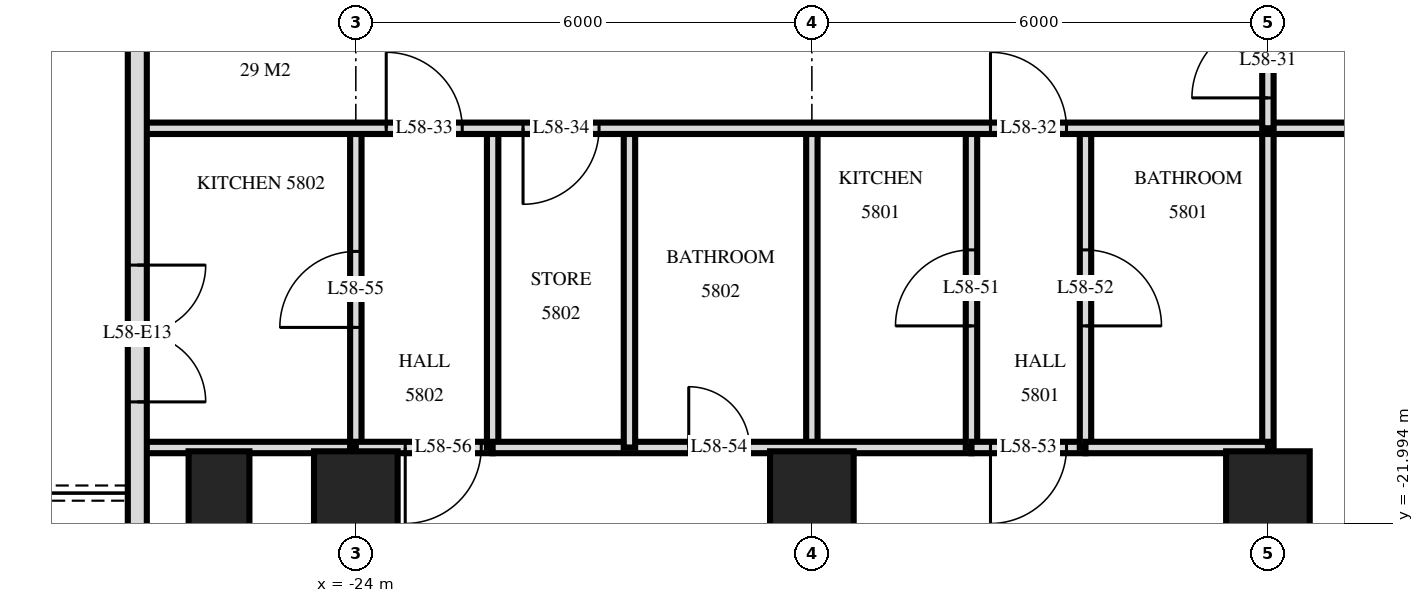
"""IFC4 building model, lengths in metres.
Left out: names, types, materials, properties, quantities, classifications, styles, units other than length and angle.
Written with IfcOpenShell. Run it as: python <this file> out.ifc"""

import sys

from ifc_helpers import new_model, si_unit, direction, frame, frame_2d, origin, origin_2d, place, context, subcontext, project, spatial, rectangle, extrude, element, fill, save


model = new_model("IFC4")
c1 = context("Model", 3, precision=1e-05, world=origin(), true_north=direction((0.0, 1.0)))
c2 = subcontext(c1, "Body", "Model", "MODEL_VIEW")
j1 = project(units=[si_unit("LENGTHUNIT", "METRE"), si_unit("PLANEANGLEUNIT", "RADIAN")], contexts=[c1])
p1 = place(None, origin())
s1 = spatial("IfcSite", under=j1, at=p1, CompositionType="ELEMENT")
p2 = place(p1, origin())
s2 = spatial("IfcBuilding", under=s1, at=p2, CompositionType="ELEMENT")
p3 = place(p2, frame((0.0, 0.0, 222.1)))
s3 = spatial("IfcBuildingStorey", under=s2, at=p3, CompositionType="ELEMENT", Elevation=222.1)
p4 = place(p3, frame((-25.8, -21.6, 0.0), z_axis=(0.0, 0.0, 1.0), x_axis=(0.0, 1.0, 0.0)))
e1 = element("IfcColumn", 1, at=p4, inside=s3, PredefinedType="COLUMN", context=c2, shape_type="SweptSolid", body=[
    extrude(rectangle(XDim=1.1, YDim=0.8, at=origin_2d()), origin(), (0.0, 0.0, 1.0), 3.5),
])
for number, where, z_axis, x_axis in (
    (2, (-24.0, -21.6, 0.0), (0.0, 0.0, 1.0), (1.0, 0.0, 0.0)),
    (3, (-18.0, -21.6, 0.0), (0.0, 0.0, 1.0), (1.0, 0.0, 0.0)),
    (4, (-12.0, -21.6, 0.0), (0.0, 0.0, 1.0), (1.0, 0.0, 0.0)),
):
    element("IfcColumn", number, at=place(p3, frame(where, z_axis=z_axis, x_axis=x_axis)), inside=s3, PredefinedType="COLUMN", context=c2, shape_type="SweptSolid", body=[
        extrude(rectangle(XDim=1.1, YDim=1.1, at=origin_2d()), origin(), (0.0, 0.0, 1.0), 3.5),
    ])
p5 = place(p3, frame((-26.875, -3.325, 0.0), z_axis=(0.0, 0.0, 1.0), x_axis=(0.0, -1.0, 0.0)))
e5 = element("IfcWall", 5, at=p5, inside=s3, PredefinedType="SOLIDWALL", context=c2, shape_type="SweptSolid", body=[
    extrude(rectangle(XDim=21.551, YDim=0.25, at=frame_2d((10.775, 0.0))), origin(), (0.0, 0.0, 1.0), 3.22),
])
p6 = place(p5, frame((7.275, 0.0, 0.0)))
e6 = element("IfcOpeningElement", 6, at=p6, cuts=e5, PredefinedType="OPENING", context=c2, shape_type="SweptSolid", body=[
    extrude(rectangle(XDim=1.8, YDim=2.4, at=frame_2d((0.9, 1.2))), frame((0.0, 0.135, 0.0), z_axis=(0.0, -1.0, 0.0), x_axis=(1.0, 0.0, 0.0)), (0.0, 0.0, 1.0), 0.27),
])
p7 = place(p5, frame((15.275, 0.0, 0.0)))
e7 = element("IfcOpeningElement", 7, at=p7, cuts=e5, PredefinedType="OPENING", context=c2, shape_type="SweptSolid", body=[
    extrude(rectangle(XDim=1.8, YDim=2.4, at=frame_2d((0.9, 1.2))), frame((0.0, 0.135, 0.0), z_axis=(0.0, -1.0, 0.0), x_axis=(1.0, 0.0, 0.0)), (0.0, 0.0, 1.0), 0.27),
])
p8 = place(p5, frame((18.875, 0.0, 0.0)))
e8 = element("IfcOpeningElement", 8, at=p8, cuts=e5, PredefinedType="OPENING", context=c2, shape_type="SweptSolid", body=[
    extrude(rectangle(XDim=1.8, YDim=2.4, at=frame_2d((0.9, 1.2))), frame((0.0, 0.135, 0.0), z_axis=(0.0, -1.0, 0.0), x_axis=(1.0, 0.0, 0.0)), (0.0, 0.0, 1.0), 0.27),
])
p9 = place(p3, frame((-12.0, -16.8, 0.0), z_axis=(0.0, 0.0, 1.0), x_axis=(0.0, 1.0, 0.0)))
e9 = element("IfcWall", 9, at=p9, inside=s3, PredefinedType="PARTITIONING", context=c2, shape_type="SweptSolid", body=[
    extrude(rectangle(XDim=1.75, YDim=0.15, at=frame_2d((0.875, 0.0))), origin(), (0.0, 0.0, 1.0), 3.22),
])
p10 = place(p9, frame((0.4, 0.0, 0.0)))
e10 = element("IfcOpeningElement", 10, at=p10, cuts=e9, PredefinedType="OPENING", context=c2, shape_type="SweptSolid", body=[
    extrude(rectangle(XDim=1.0, YDim=2.1, at=frame_2d((0.5, 1.05))), frame((0.0, 0.085, 0.0), z_axis=(0.0, -1.0, 0.0), x_axis=(1.0, 0.0, 0.0)), (0.0, 0.0, 1.0), 0.17),
])
p11 = place(p3, frame((-12.0, -29.22, 0.0), z_axis=(0.0, 0.0, 1.0), x_axis=(0.0, 1.0, 0.0)))
e11 = element("IfcWall", 11, at=p11, inside=s3, PredefinedType="PARTITIONING", context=c2, shape_type="SweptSolid", body=[
    extrude(rectangle(XDim=12.42, YDim=0.15, at=frame_2d((6.21, 0.0))), origin(), (0.0, 0.0, 1.0), 3.22),
])
p12 = place(p3, frame((-14.4, -21.0, 0.0), z_axis=(0.0, 0.0, 1.0), x_axis=(0.0, 1.0, 0.0)))
e12 = element("IfcWall", 12, at=p12, inside=s3, PredefinedType="PARTITIONING", context=c2, shape_type="SweptSolid", body=[
    extrude(rectangle(XDim=4.2, YDim=0.15, at=frame_2d((2.1, 0.0))), origin(), (0.0, 0.0, 1.0), 3.22),
])
p13 = place(p12, frame((1.6, 0.0, 0.0)))
e13 = element("IfcOpeningElement", 13, at=p13, cuts=e12, PredefinedType="OPENING", context=c2, shape_type="SweptSolid", body=[
    extrude(rectangle(XDim=1.0, YDim=2.1, at=frame_2d((0.5, 1.05))), frame((0.0, 0.085, 0.0), z_axis=(0.0, -1.0, 0.0), x_axis=(1.0, 0.0, 0.0)), (0.0, 0.0, 1.0), 0.17),
])
p14 = place(p3, frame((-15.9, -21.0, 0.0), z_axis=(0.0, 0.0, 1.0), x_axis=(0.0, 1.0, 0.0)))
e14 = element("IfcWall", 14, at=p14, inside=s3, PredefinedType="PARTITIONING", context=c2, shape_type="SweptSolid", body=[
    extrude(rectangle(XDim=4.2, YDim=0.15, at=frame_2d((2.1, 0.0))), origin(), (0.0, 0.0, 1.0), 3.22),
])
p15 = place(p14, frame((1.6, 0.0, 0.0)))
e15 = element("IfcOpeningElement", 15, at=p15, cuts=e14, PredefinedType="OPENING", context=c2, shape_type="SweptSolid", body=[
    extrude(rectangle(XDim=1.0, YDim=2.1, at=frame_2d((0.5, 1.05))), frame((0.0, 0.085, 0.0), z_axis=(0.0, -1.0, 0.0), x_axis=(1.0, 0.0, 0.0)), (0.0, 0.0, 1.0), 0.17),
])
p16 = place(p3, frame((-18.0, -29.22, 0.0), z_axis=(0.0, 0.0, 1.0), x_axis=(0.0, 1.0, 0.0)))
e16 = element("IfcWall", 16, at=p16, inside=s3, PredefinedType="PARTITIONING", context=c2, shape_type="SweptSolid", body=[
    extrude(rectangle(XDim=12.42, YDim=0.15, at=frame_2d((6.21, 0.0))), origin(), (0.0, 0.0, 1.0), 3.22),
])
for number, where, z_axis, x_axis in (
    (17, (-20.4, -21.0, 0.0), (0.0, 0.0, 1.0), (0.0, 1.0, 0.0)),
    (18, (-22.2, -21.0, 0.0), (0.0, 0.0, 1.0), (0.0, 1.0, 0.0)),
):
    element("IfcWall", number, at=place(p3, frame(where, z_axis=z_axis, x_axis=x_axis)), inside=s3, PredefinedType="PARTITIONING", context=c2, shape_type="SweptSolid", body=[
        extrude(rectangle(XDim=4.2, YDim=0.15, at=frame_2d((2.1, 0.0))), origin(), (0.0, 0.0, 1.0), 3.22),
    ])
p17 = place(p3, frame((-24.0, -21.0, 0.0), z_axis=(0.0, 0.0, 1.0), x_axis=(0.0, 1.0, 0.0)))
e19 = element("IfcWall", 19, at=p17, inside=s3, PredefinedType="PARTITIONING", context=c2, shape_type="SweptSolid", body=[
    extrude(rectangle(XDim=4.2, YDim=0.15, at=frame_2d((2.1, 0.0))), origin(), (0.0, 0.0, 1.0), 3.22),
])
p18 = place(p17, frame((1.58, 0.0, 0.0)))
e20 = element("IfcOpeningElement", 20, at=p18, cuts=e19, PredefinedType="OPENING", context=c2, shape_type="SweptSolid", body=[
    extrude(rectangle(XDim=1.0, YDim=2.1, at=frame_2d((0.5, 1.05))), frame((0.0, 0.085, 0.0), z_axis=(0.0, -1.0, 0.0), x_axis=(1.0, 0.0, 0.0)), (0.0, 0.0, 1.0), 0.17),
])
p19 = place(p3, frame((-24.0, -28.918, 0.0), z_axis=(0.0, 0.0, 1.0), x_axis=(0.0, 1.0, 0.0)))
e21 = element("IfcWall", 21, at=p19, inside=s3, PredefinedType="PARTITIONING", context=c2, shape_type="SweptSolid", body=[
    extrude(rectangle(XDim=7.918, YDim=0.15, at=frame_2d((3.959, 0.0))), origin(), (0.0, 0.0, 1.0), 3.22),
])
p20 = place(p19, frame((3.436, 0.0, 0.0)))
e22 = element("IfcOpeningElement", 22, at=p20, cuts=e21, PredefinedType="OPENING", context=c2, shape_type="SweptSolid", body=[
    extrude(rectangle(XDim=0.9, YDim=2.1, at=frame_2d((0.45, 1.05))), frame((0.0, 0.085, 0.0), z_axis=(0.0, -1.0, 0.0), x_axis=(1.0, 0.0, 0.0)), (0.0, 0.0, 1.0), 0.17),
])
p21 = place(p3, frame((-24.0, -21.0, 0.0), z_axis=(0.0, 0.0, 1.0), x_axis=(1.0, 0.0, 0.0)))
e23 = element("IfcWall", 23, at=p21, inside=s3, PredefinedType="PARTITIONING", context=c2, shape_type="SweptSolid", body=[
    extrude(rectangle(XDim=1.8, YDim=0.15, at=frame_2d((0.9, 0.0))), origin(), (0.0, 0.0, 1.0), 3.22),
])
p22 = place(p21, frame((0.65, 0.0, 0.0)))
e24 = element("IfcOpeningElement", 24, at=p22, cuts=e23, PredefinedType="OPENING", context=c2, shape_type="SweptSolid", body=[
    extrude(rectangle(XDim=1.0, YDim=2.1, at=frame_2d((0.5, 1.05))), frame((0.0, 0.085, 0.0), z_axis=(0.0, -1.0, 0.0), x_axis=(1.0, 0.0, 0.0)), (0.0, 0.0, 1.0), 0.17),
])
p23 = place(p3, frame((-15.9, -21.0, 0.0), z_axis=(0.0, 0.0, 1.0), x_axis=(1.0, 0.0, 0.0)))
e25 = element("IfcWall", 25, at=p23, inside=s3, PredefinedType="PARTITIONING", context=c2, shape_type="SweptSolid", body=[
    extrude(rectangle(XDim=1.5, YDim=0.15, at=frame_2d((0.75, 0.0))), origin(), (0.0, 0.0, 1.0), 3.22),
])
p24 = place(p23, frame((0.25, 0.0, 0.0)))
e26 = element("IfcOpeningElement", 26, at=p24, cuts=e25, PredefinedType="OPENING", context=c2, shape_type="SweptSolid", body=[
    extrude(rectangle(XDim=1.0, YDim=2.1, at=frame_2d((0.5, 1.05))), frame((0.0, 0.085, 0.0), z_axis=(0.0, -1.0, 0.0), x_axis=(1.0, 0.0, 0.0)), (0.0, 0.0, 1.0), 0.17),
])
p25 = place(p3, frame((-26.82, -21.0, 0.0), z_axis=(0.0, 0.0, 1.0), x_axis=(1.0, 0.0, 0.0)))
e27 = element("IfcWall", 27, at=p25, inside=s3, PredefinedType="PARTITIONING", context=c2, shape_type="SweptSolid", body=[
    extrude(rectangle(XDim=2.82, YDim=0.15, at=frame_2d((1.41, 0.0))), origin(), (0.0, 0.0, 1.0), 3.22),
])
p26 = place(p3, frame((-22.2, -21.0, 0.0), z_axis=(0.0, 0.0, 1.0), x_axis=(1.0, 0.0, 0.0)))
e28 = element("IfcWall", 28, at=p26, inside=s3, PredefinedType="PARTITIONING", context=c2, shape_type="SweptSolid", body=[
    extrude(rectangle(XDim=6.3, YDim=0.15, at=frame_2d((3.15, 0.0))), origin(), (0.0, 0.0, 1.0), 3.22),
])
p27 = place(p26, frame((2.58, 0.0, 0.0)))
e29 = element("IfcOpeningElement", 29, at=p27, cuts=e28, PredefinedType="OPENING", context=c2, shape_type="SweptSolid", body=[
    extrude(rectangle(XDim=0.8, YDim=2.1, at=frame_2d((0.4, 1.05))), frame((0.0, 0.085, 0.0), z_axis=(0.0, -1.0, 0.0), x_axis=(1.0, 0.0, 0.0)), (0.0, 0.0, 1.0), 0.17),
])
p28 = place(p3, frame((-14.4, -21.0, 0.0), z_axis=(0.0, 0.0, 1.0), x_axis=(1.0, 0.0, 0.0)))
e30 = element("IfcWall", 30, at=p28, inside=s3, PredefinedType="PARTITIONING", context=c2, shape_type="SweptSolid", body=[
    extrude(rectangle(XDim=2.4, YDim=0.15, at=frame_2d((1.2, 0.0))), origin(), (0.0, 0.0, 1.0), 3.22),
])
p29 = place(p3, frame((-26.82, -16.8, 0.0), z_axis=(0.0, 0.0, 1.0), x_axis=(1.0, 0.0, 0.0)))
e31 = element("IfcWall", 31, at=p29, inside=s3, PredefinedType="PARTITIONING", context=c2, shape_type="SweptSolid", body=[
    extrude(rectangle(XDim=53.64, YDim=0.15, at=frame_2d((26.82, 0.0))), origin(), (0.0, 0.0, 1.0), 3.22),
])
p30 = place(p29, frame((11.17, 0.0, 0.0)))
e32 = element("IfcOpeningElement", 32, at=p30, cuts=e31, PredefinedType="OPENING", context=c2, shape_type="SweptSolid", body=[
    extrude(rectangle(XDim=1.0, YDim=2.1, at=frame_2d((0.5, 1.05))), frame((0.0, 0.085, 0.0), z_axis=(0.0, -1.0, 0.0), x_axis=(1.0, 0.0, 0.0)), (0.0, 0.0, 1.0), 0.17),
])
p31 = place(p29, frame((3.22, 0.0, 0.0)))
e33 = element("IfcOpeningElement", 33, at=p31, cuts=e31, PredefinedType="OPENING", context=c2, shape_type="SweptSolid", body=[
    extrude(rectangle(XDim=1.0, YDim=2.1, at=frame_2d((0.5, 1.05))), frame((0.0, 0.085, 0.0), z_axis=(0.0, -1.0, 0.0), x_axis=(1.0, 0.0, 0.0)), (0.0, 0.0, 1.0), 0.17),
])
p32 = place(p29, frame((5.02, 0.0, 0.0)))
e34 = element("IfcOpeningElement", 34, at=p32, cuts=e31, PredefinedType="OPENING", context=c2, shape_type="SweptSolid", body=[
    extrude(rectangle(XDim=1.0, YDim=2.1, at=frame_2d((0.5, 1.05))), frame((0.0, 0.085, 0.0), z_axis=(0.0, -1.0, 0.0), x_axis=(1.0, 0.0, 0.0)), (0.0, 0.0, 1.0), 0.17),
])
p33 = place(p29, frame((47.72, 0.0, 0.0)))
e35 = element("IfcOpeningElement", 35, at=p33, cuts=e31, PredefinedType="OPENING", context=c2, shape_type="SweptSolid", body=[
    extrude(rectangle(XDim=1.0, YDim=2.1, at=frame_2d((0.5, 1.05))), frame((0.0, 0.085, 0.0), z_axis=(0.0, -1.0, 0.0), x_axis=(1.0, 0.0, 0.0)), (0.0, 0.0, 1.0), 0.17),
])
p34 = place(p29, frame((51.04, 0.0, 0.0)))
e36 = element("IfcOpeningElement", 36, at=p34, cuts=e31, PredefinedType="OPENING", context=c2, shape_type="SweptSolid", body=[
    extrude(rectangle(XDim=1.0, YDim=2.1, at=frame_2d((0.5, 1.05))), frame((0.0, 0.085, 0.0), z_axis=(0.0, -1.0, 0.0), x_axis=(1.0, 0.0, 0.0)), (0.0, 0.0, 1.0), 0.17),
])
p35 = place(p29, frame((17.32, 0.0, 0.0)))
e37 = element("IfcOpeningElement", 37, at=p35, cuts=e31, PredefinedType="OPENING", context=c2, shape_type="SweptSolid", body=[
    extrude(rectangle(XDim=1.0, YDim=2.1, at=frame_2d((0.5, 1.05))), frame((0.0, 0.085, 0.0), z_axis=(0.0, -1.0, 0.0), x_axis=(1.0, 0.0, 0.0)), (0.0, 0.0, 1.0), 0.17),
])
p36 = place(p29, frame((26.32, 0.0, 0.0)))
e38 = element("IfcOpeningElement", 38, at=p36, cuts=e31, PredefinedType="OPENING", context=c2, shape_type="SweptSolid", body=[
    extrude(rectangle(XDim=1.0, YDim=2.1, at=frame_2d((0.5, 1.05))), frame((0.0, 0.085, 0.0), z_axis=(0.0, -1.0, 0.0), x_axis=(1.0, 0.0, 0.0)), (0.0, 0.0, 1.0), 0.17),
])
p37 = place(p29, frame((35.32, 0.0, 0.0)))
e39 = element("IfcOpeningElement", 39, at=p37, cuts=e31, PredefinedType="OPENING", context=c2, shape_type="SweptSolid", body=[
    extrude(rectangle(XDim=1.0, YDim=2.1, at=frame_2d((0.5, 1.05))), frame((0.0, 0.085, 0.0), z_axis=(0.0, -1.0, 0.0), x_axis=(1.0, 0.0, 0.0)), (0.0, 0.0, 1.0), 0.17),
])
p38 = place(p7, origin())
e40 = element("IfcDoor", 40, at=p38, inside=s3, OperationType="DOUBLE_DOOR_SINGLE_SWING", PredefinedType="DOOR", context=c2, shape_type="SweptSolid", body=[
    extrude(rectangle(XDim=1.8, YDim=2.4, at=frame_2d((0.9, 1.2))), frame((0.0, 0.025, 0.0), z_axis=(0.0, -1.0, 0.0), x_axis=(1.0, 0.0, 0.0)), (0.0, 0.0, 1.0), 0.05),
])
fill(e7, e40)
p39 = place(p10, origin())
e41 = element("IfcDoor", 41, at=p39, inside=s3, OperationType="SINGLE_SWING_RIGHT", PredefinedType="DOOR", context=c2, shape_type="SweptSolid", body=[
    extrude(rectangle(XDim=1.0, YDim=2.1, at=frame_2d((0.5, 1.05))), frame((0.0, 0.025, 0.0), z_axis=(0.0, -1.0, 0.0), x_axis=(1.0, 0.0, 0.0)), (0.0, 0.0, 1.0), 0.05),
])
fill(e10, e41)
p40 = place(p30, origin())
e42 = element("IfcDoor", 42, at=p40, inside=s3, OperationType="SINGLE_SWING_RIGHT", PredefinedType="DOOR", context=c2, shape_type="SweptSolid", body=[
    extrude(rectangle(XDim=1.0, YDim=2.1, at=frame_2d((0.5, 1.05))), frame((0.0, 0.025, 0.0), z_axis=(0.0, -1.0, 0.0), x_axis=(1.0, 0.0, 0.0)), (0.0, 0.0, 1.0), 0.05),
])
fill(e32, e42)
p41 = place(p31, origin())
e43 = element("IfcDoor", 43, at=p41, inside=s3, OperationType="SINGLE_SWING_RIGHT", PredefinedType="DOOR", context=c2, shape_type="SweptSolid", body=[
    extrude(rectangle(XDim=1.0, YDim=2.1, at=frame_2d((0.5, 1.05))), frame((0.0, 0.025, 0.0), z_axis=(0.0, -1.0, 0.0), x_axis=(1.0, 0.0, 0.0)), (0.0, 0.0, 1.0), 0.05),
])
fill(e33, e43)
p42 = place(p32, frame((0.5, 0.0, 0.0), z_axis=(0.0, 0.0, 1.0), x_axis=(-1.0, 0.0, 0.0)))
e44 = element("IfcDoor", 44, at=p42, inside=s3, OperationType="SINGLE_SWING_LEFT", PredefinedType="DOOR", context=c2, shape_type="SweptSolid", body=[
    extrude(rectangle(XDim=1.0, YDim=2.1, at=frame_2d((0.0, 1.05))), frame((0.0, -0.025, 0.0), z_axis=(0.0, 1.0, 0.0), x_axis=(-1.0, 0.0, 0.0)), (0.0, 0.0, 1.0), 0.05),
])
fill(e34, e44)
p43 = place(p15, origin())
e45 = element("IfcDoor", 45, at=p43, inside=s3, OperationType="SINGLE_SWING_RIGHT", PredefinedType="DOOR", context=c2, shape_type="SweptSolid", body=[
    extrude(rectangle(XDim=1.0, YDim=2.1, at=frame_2d((0.5, 1.05))), frame((0.0, 0.025, 0.0), z_axis=(0.0, -1.0, 0.0), x_axis=(1.0, 0.0, 0.0)), (0.0, 0.0, 1.0), 0.05),
])
fill(e15, e45)
p44 = place(p13, frame((0.5, 0.0, 0.0), z_axis=(0.0, 0.0, 1.0), x_axis=(-1.0, 0.0, 0.0)))
e46 = element("IfcDoor", 46, at=p44, inside=s3, OperationType="SINGLE_SWING_LEFT", PredefinedType="DOOR", context=c2, shape_type="SweptSolid", body=[
    extrude(rectangle(XDim=1.0, YDim=2.1, at=frame_2d((0.0, 1.05))), frame((0.0, -0.025, 0.0), z_axis=(0.0, 1.0, 0.0), x_axis=(-1.0, 0.0, 0.0)), (0.0, 0.0, 1.0), 0.05),
])
fill(e13, e46)
p45 = place(p24, frame((0.5, 0.0, 0.0), z_axis=(0.0, 0.0, 1.0), x_axis=(-1.0, 0.0, 0.0)))
e47 = element("IfcDoor", 47, at=p45, inside=s3, OperationType="SINGLE_SWING_LEFT", PredefinedType="DOOR", context=c2, shape_type="SweptSolid", body=[
    extrude(rectangle(XDim=1.0, YDim=2.1, at=frame_2d((0.0, 1.05))), frame((0.0, -0.025, 0.0), z_axis=(0.0, 1.0, 0.0), x_axis=(-1.0, 0.0, 0.0)), (0.0, 0.0, 1.0), 0.05),
])
fill(e26, e47)
p46 = place(p27, origin())
e48 = element("IfcDoor", 48, at=p46, inside=s3, OperationType="SINGLE_SWING_RIGHT", PredefinedType="DOOR", context=c2, shape_type="SweptSolid", body=[
    extrude(rectangle(XDim=0.8, YDim=2.1, at=frame_2d((0.4, 1.05))), frame((0.0, 0.025, 0.0), z_axis=(0.0, -1.0, 0.0), x_axis=(1.0, 0.0, 0.0)), (0.0, 0.0, 1.0), 0.05),
])
fill(e29, e48)
p47 = place(p18, origin())
e49 = element("IfcDoor", 49, at=p47, inside=s3, OperationType="SINGLE_SWING_RIGHT", PredefinedType="DOOR", context=c2, shape_type="SweptSolid", body=[
    extrude(rectangle(XDim=1.0, YDim=2.1, at=frame_2d((0.5, 1.05))), frame((0.0, 0.025, 0.0), z_axis=(0.0, -1.0, 0.0), x_axis=(1.0, 0.0, 0.0)), (0.0, 0.0, 1.0), 0.05),
])
fill(e20, e49)
p48 = place(p22, frame((0.5, 0.0, 0.0), z_axis=(0.0, 0.0, 1.0), x_axis=(-1.0, 0.0, 0.0)))
e50 = element("IfcDoor", 50, at=p48, inside=s3, OperationType="SINGLE_SWING_LEFT", PredefinedType="DOOR", context=c2, shape_type="SweptSolid", body=[
    extrude(rectangle(XDim=1.0, YDim=2.1, at=frame_2d((0.0, 1.05))), frame((0.0, -0.025, 0.0), z_axis=(0.0, 1.0, 0.0), x_axis=(-1.0, 0.0, 0.0)), (0.0, 0.0, 1.0), 0.05),
])
fill(e24, e50)
save(model, sys.argv[1])
